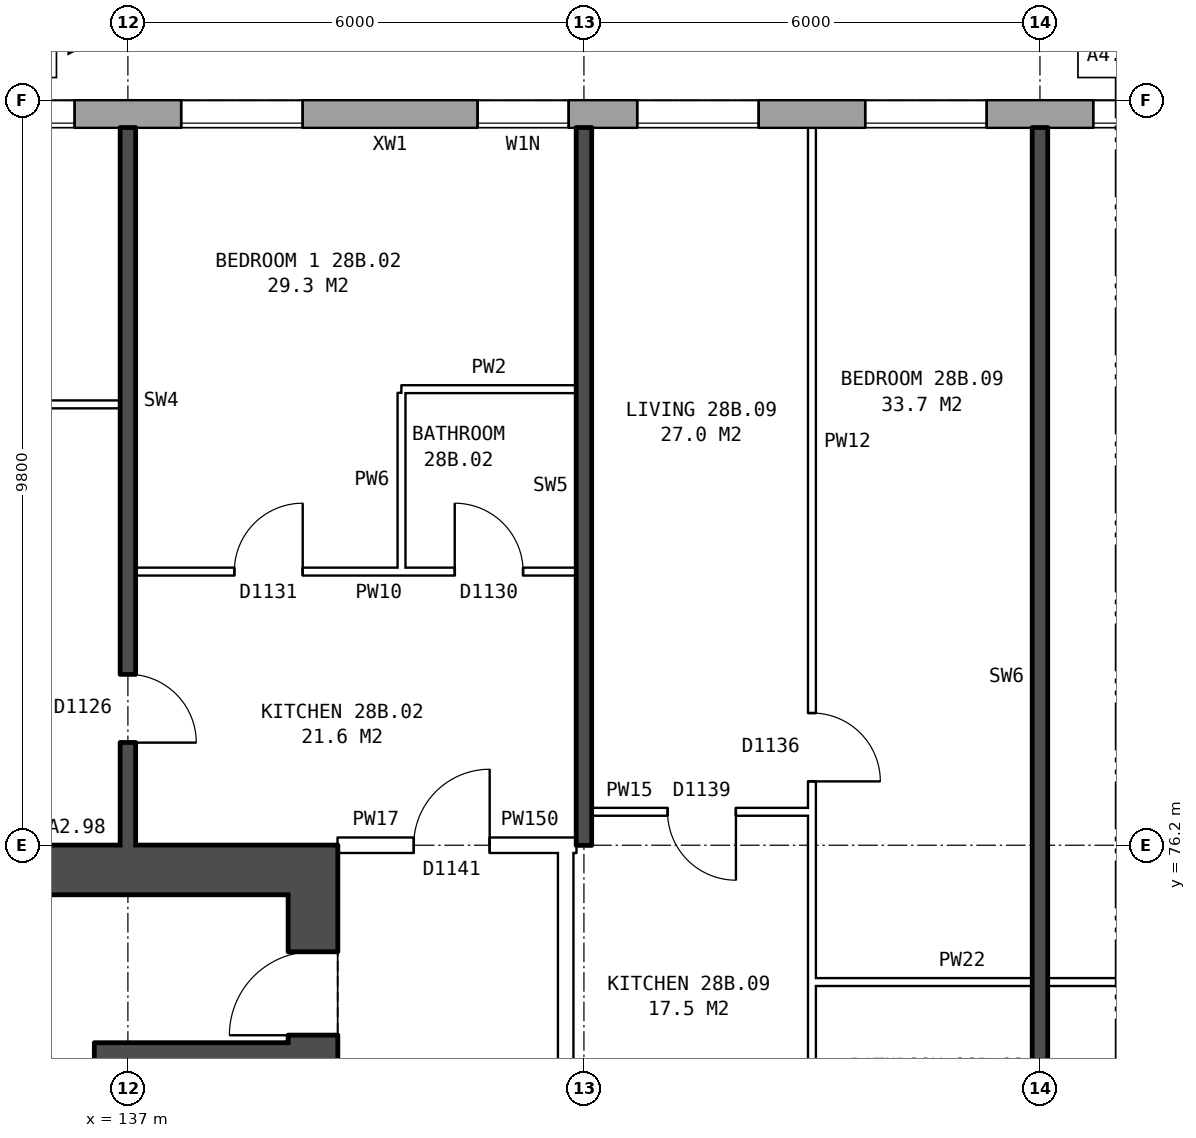
"""IFC4 building model, lengths in metres.
Left out: names, types, materials, properties, quantities, classifications, styles, units other than length and angle.
Written with IfcOpenShell. Run it as: python <this file> out.ifc"""

import sys

from ifc_helpers import new_model, si_unit, direction, frame, frame_2d, origin, place, context, subcontext, project, spatial, rectangle, extrude, element, fill, save


model = new_model("IFC4")
c1 = context("Model", 3, precision=1e-05, world=origin(), true_north=direction((0.0, 1.0)))
c2 = subcontext(c1, "Body", "Model", "MODEL_VIEW")
j1 = project(units=[si_unit("LENGTHUNIT", "METRE"), si_unit("PLANEANGLEUNIT", "RADIAN")], contexts=[c1])
p1 = place(None, origin())
s1 = spatial("IfcSite", under=j1, at=p1, CompositionType="ELEMENT")
p2 = place(p1, origin())
s2 = spatial("IfcBuilding", under=s1, at=p2, CompositionType="ELEMENT")
p3 = place(p2, frame((0.0, 0.0, 102.6)))
s3 = spatial("IfcBuildingStorey", under=s2, at=p3, CompositionType="ELEMENT", Elevation=102.6)
p4 = place(p3, frame((170.925, 85.82, 0.0), z_axis=(0.0, 0.0, 1.0), x_axis=(-1.0, 0.0, 0.0)))
e1 = element("IfcWall", 1, at=p4, inside=s3, PredefinedType="STANDARD", context=c2, shape_type="SweptSolid", body=[
    extrude(rectangle(XDim=36.851, YDim=0.36, at=frame_2d((18.425, 0.0))), origin(), (0.0, 0.0, 1.0), 2.85),
])
p5 = place(p4, frame((1.625, 0.0, 0.8)))
e2 = element("IfcOpeningElement", 2, at=p5, cuts=e1, PredefinedType="OPENING", context=c2, shape_type="SweptSolid", body=[
    extrude(rectangle(XDim=1.6, YDim=1.8, at=frame_2d((0.8, 0.9))), frame((0.0, 0.19, 0.0), z_axis=(0.0, -1.0, 0.0), x_axis=(1.0, 0.0, 0.0)), (0.0, 0.0, 1.0), 0.38),
])
p6 = place(p4, frame((4.125, 0.0, 0.8)))
e3 = element("IfcOpeningElement", 3, at=p6, cuts=e1, PredefinedType="OPENING", context=c2, shape_type="SweptSolid", body=[
    extrude(rectangle(XDim=0.8, YDim=1.8, at=frame_2d((0.4, 0.9))), frame((0.0, 0.19, 0.0), z_axis=(0.0, -1.0, 0.0), x_axis=(1.0, 0.0, 0.0)), (0.0, 0.0, 1.0), 0.38),
])
p7 = place(p4, frame((5.225, 0.0, 1.7)))
e4 = element("IfcOpeningElement", 4, at=p7, cuts=e1, PredefinedType="OPENING", context=c2, shape_type="SweptSolid", body=[
    extrude(rectangle(XDim=0.8, YDim=0.9, at=frame_2d((0.4, 0.45))), frame((0.0, 0.19, 0.0), z_axis=(0.0, -1.0, 0.0), x_axis=(1.0, 0.0, 0.0)), (0.0, 0.0, 1.0), 0.38),
])
p8 = place(p4, frame((10.625, 0.0, 0.8)))
e5 = element("IfcOpeningElement", 5, at=p8, cuts=e1, PredefinedType="OPENING", context=c2, shape_type="SweptSolid", body=[
    extrude(rectangle(XDim=1.6, YDim=1.8, at=frame_2d((0.8, 0.9))), frame((0.0, 0.19, 0.0), z_axis=(0.0, -1.0, 0.0), x_axis=(1.0, 0.0, 0.0)), (0.0, 0.0, 1.0), 0.38),
])
p9 = place(p4, frame((13.625, 0.0, 0.8)))
e6 = element("IfcOpeningElement", 6, at=p9, cuts=e1, PredefinedType="OPENING", context=c2, shape_type="SweptSolid", body=[
    extrude(rectangle(XDim=1.6, YDim=1.8, at=frame_2d((0.8, 0.9))), frame((0.0, 0.19, 0.0), z_axis=(0.0, -1.0, 0.0), x_axis=(1.0, 0.0, 0.0)), (0.0, 0.0, 1.0), 0.38),
])
p10 = place(p4, frame((16.625, 0.0, 0.8)))
e7 = element("IfcOpeningElement", 7, at=p10, cuts=e1, PredefinedType="OPENING", context=c2, shape_type="SweptSolid", body=[
    extrude(rectangle(XDim=1.6, YDim=1.8, at=frame_2d((0.8, 0.9))), frame((0.0, 0.19, 0.0), z_axis=(0.0, -1.0, 0.0), x_axis=(1.0, 0.0, 0.0)), (0.0, 0.0, 1.0), 0.38),
])
p11 = place(p4, frame((19.625, 0.0, 0.8)))
e8 = element("IfcOpeningElement", 8, at=p11, cuts=e1, PredefinedType="OPENING", context=c2, shape_type="SweptSolid", body=[
    extrude(rectangle(XDim=1.6, YDim=1.8, at=frame_2d((0.8, 0.9))), frame((0.0, 0.19, 0.0), z_axis=(0.0, -1.0, 0.0), x_axis=(1.0, 0.0, 0.0)), (0.0, 0.0, 1.0), 0.38),
])
p12 = place(p4, frame((22.625, 0.0, 0.8)))
e9 = element("IfcOpeningElement", 9, at=p12, cuts=e1, PredefinedType="OPENING", context=c2, shape_type="SweptSolid", body=[
    extrude(rectangle(XDim=1.6, YDim=1.8, at=frame_2d((0.8, 0.9))), frame((0.0, 0.19, 0.0), z_axis=(0.0, -1.0, 0.0), x_axis=(1.0, 0.0, 0.0)), (0.0, 0.0, 1.0), 0.38),
])
p13 = place(p4, frame((25.625, 0.0, 0.8)))
e10 = element("IfcOpeningElement", 10, at=p13, cuts=e1, PredefinedType="OPENING", context=c2, shape_type="SweptSolid", body=[
    extrude(rectangle(XDim=1.6, YDim=1.8, at=frame_2d((0.8, 0.9))), frame((0.0, 0.19, 0.0), z_axis=(0.0, -1.0, 0.0), x_axis=(1.0, 0.0, 0.0)), (0.0, 0.0, 1.0), 0.38),
])
p14 = place(p4, frame((28.125, 0.0, 0.8)))
e11 = element("IfcOpeningElement", 11, at=p14, cuts=e1, PredefinedType="OPENING", context=c2, shape_type="SweptSolid", body=[
    extrude(rectangle(XDim=1.2, YDim=1.2, at=frame_2d((0.6, 0.6))), frame((0.0, 0.19, 0.0), z_axis=(0.0, -1.0, 0.0), x_axis=(1.0, 0.0, 0.0)), (0.0, 0.0, 1.0), 0.38),
])
p15 = place(p4, frame((31.625, 0.0, 0.8)))
e12 = element("IfcOpeningElement", 12, at=p15, cuts=e1, PredefinedType="OPENING", context=c2, shape_type="SweptSolid", body=[
    extrude(rectangle(XDim=1.6, YDim=1.8, at=frame_2d((0.8, 0.9))), frame((0.0, 0.19, 0.0), z_axis=(0.0, -1.0, 0.0), x_axis=(1.0, 0.0, 0.0)), (0.0, 0.0, 1.0), 0.38),
])
p16 = place(p4, frame((34.625, 0.0, 0.8)))
e13 = element("IfcOpeningElement", 13, at=p16, cuts=e1, PredefinedType="OPENING", context=c2, shape_type="SweptSolid", body=[
    extrude(rectangle(XDim=1.6, YDim=1.8, at=frame_2d((0.8, 0.9))), frame((0.0, 0.19, 0.0), z_axis=(0.0, -1.0, 0.0), x_axis=(1.0, 0.0, 0.0)), (0.0, 0.0, 1.0), 0.38),
])
p17 = place(p4, frame((7.125, 0.0, 0.8)))
e14 = element("IfcOpeningElement", 14, at=p17, cuts=e1, PredefinedType="OPENING", context=c2, shape_type="SweptSolid", body=[
    extrude(rectangle(XDim=0.8, YDim=0.9, at=frame_2d((0.4, 0.45))), frame((0.0, 0.19, 0.0), z_axis=(0.0, -1.0, 0.0), x_axis=(1.0, 0.0, 0.0)), (0.0, 0.0, 1.0), 0.38),
])
p18 = place(p4, frame((8.225, 0.0, 0.8)))
e15 = element("IfcOpeningElement", 15, at=p18, cuts=e1, PredefinedType="OPENING", context=c2, shape_type="SweptSolid", body=[
    extrude(rectangle(XDim=1.4, YDim=1.8, at=frame_2d((0.7, 0.9))), frame((0.0, 0.19, 0.0), z_axis=(0.0, -1.0, 0.0), x_axis=(1.0, 0.0, 0.0)), (0.0, 0.0, 1.0), 0.38),
])
p19 = place(p3, frame((139.435, 64.45, 0.0), z_axis=(0.0, 0.0, 1.0), x_axis=(0.0, 1.0, 0.0)))
e16 = element("IfcWall", 16, at=p19, inside=s3, PredefinedType="SHEAR", context=c2, shape_type="SweptSolid", body=[
    extrude(rectangle(XDim=11.1, YDim=0.65, at=frame_2d((5.55, 0.0))), origin(), (0.0, 0.0, 1.0), 2.85),
])
p20 = place(p19, frame((0.675, 0.0, 0.0)))
e17 = element("IfcOpeningElement", 17, at=p20, cuts=e16, PredefinedType="OPENING", context=c2, shape_type="SweptSolid", body=[
    extrude(rectangle(XDim=1.1, YDim=2.1, at=frame_2d((0.55, 1.05))), frame((0.0, 0.335, 0.0), z_axis=(0.0, -1.0, 0.0), x_axis=(1.0, 0.0, 0.0)), (0.0, 0.0, 1.0), 0.67),
])
p21 = place(p19, frame((9.25, 0.0, 0.0)))
e18 = element("IfcOpeningElement", 18, at=p21, cuts=e16, PredefinedType="OPENING", context=c2, shape_type="SweptSolid", body=[
    extrude(rectangle(XDim=1.1, YDim=2.1, at=frame_2d((0.55, 1.05))), frame((0.0, 0.335, 0.0), z_axis=(0.0, -1.0, 0.0), x_axis=(1.0, 0.0, 0.0)), (0.0, 0.0, 1.0), 0.67),
])
p22 = place(p19, frame((7.475, 0.0, 0.0)))
e19 = element("IfcOpeningElement", 19, at=p22, cuts=e16, PredefinedType="OPENING", context=c2, shape_type="SweptSolid", body=[
    extrude(rectangle(XDim=0.85, YDim=2.1, at=frame_2d((0.425, 1.05))), frame((0.0, 0.335, 0.0), z_axis=(0.0, -1.0, 0.0), x_axis=(1.0, 0.0, 0.0)), (0.0, 0.0, 1.0), 0.67),
])
p23 = place(p3, frame((139.76, 75.875, 0.0), z_axis=(0.0, 0.0, 1.0), x_axis=(-1.0, 0.0, 0.0)))
e20 = element("IfcWall", 20, at=p23, inside=s3, PredefinedType="SHEAR", context=c2, shape_type="SweptSolid", body=[
    extrude(rectangle(XDim=8.4, YDim=0.65, at=frame_2d((4.2, 0.0))), origin(), (0.0, 0.0, 1.0), 2.85),
])
p24 = place(p3, frame((139.11, 73.45, 0.0), z_axis=(0.0, 0.0, 1.0), x_axis=(-1.0, 0.0, 0.0)))
e21 = element("IfcWall", 21, at=p24, inside=s3, PredefinedType="SHEAR", context=c2, shape_type="SweptSolid", body=[
    extrude(rectangle(XDim=2.25, YDim=0.3, at=frame_2d((1.125, 0.0))), origin(), (0.0, 0.0, 1.0), 2.85),
])
p25 = place(p3, frame((136.71, 71.4, 0.0), z_axis=(0.0, 0.0, 1.0), x_axis=(0.0, 1.0, 0.0)))
e22 = element("IfcWall", 22, at=p25, inside=s3, PredefinedType="SHEAR", context=c2, shape_type="SweptSolid", body=[
    extrude(rectangle(XDim=2.2, YDim=0.3, at=frame_2d((1.1, 0.0))), origin(), (0.0, 0.0, 1.0), 2.85),
])
p26 = place(p3, frame((142.76, 63.9, 0.0), z_axis=(0.0, 0.0, 1.0), x_axis=(0.0, 1.0, 0.0)))
e23 = element("IfcWall", 23, at=p26, inside=s3, PredefinedType="PARTITIONING", context=c2, shape_type="SweptSolid", body=[
    extrude(rectangle(XDim=12.2, YDim=0.2, at=frame_2d((6.1, 0.0))), origin(), (0.0, 0.0, 1.0), 2.85),
])
p27 = place(p26, frame((5.1, 0.0, 0.0)))
e24 = element("IfcOpeningElement", 24, at=p27, cuts=e23, PredefinedType="OPENING", context=c2, shape_type="SweptSolid", body=[
    extrude(rectangle(XDim=2.0, YDim=2.1, at=frame_2d((1.0, 1.05))), frame((0.0, 0.11, 0.0), z_axis=(0.0, -1.0, 0.0), x_axis=(1.0, 0.0, 0.0)), (0.0, 0.0, 1.0), 0.22),
])
p28 = place(p3, frame((146.0, 74.4, 0.0), z_axis=(0.0, 0.0, 1.0), x_axis=(1.0, 0.0, 0.0)))
e25 = element("IfcWall", 25, at=p28, inside=s3, PredefinedType="PARTITIONING", context=c2, shape_type="SweptSolid", body=[
    extrude(rectangle(XDim=6.0, YDim=0.1, at=frame_2d((3.0, 0.0))), origin(), (0.0, 0.0, 1.0), 2.85),
])
p29 = place(p3, frame((139.76, 76.2, 0.0), z_axis=(0.0, 0.0, 1.0), x_axis=(1.0, 0.0, 0.0)))
e26 = element("IfcWall", 26, at=p29, inside=s3, PredefinedType="PARTITIONING", context=c2, shape_type="SweptSolid", body=[
    extrude(rectangle(XDim=3.0, YDim=0.2, at=frame_2d((1.5, 0.0))), origin(), (0.0, 0.0, 1.0), 2.85),
])
p30 = place(p29, frame((1.0, 0.0, 0.0)))
e27 = element("IfcOpeningElement", 27, at=p30, cuts=e26, PredefinedType="OPENING", context=c2, shape_type="SweptSolid", body=[
    extrude(rectangle(XDim=1.0, YDim=2.1, at=frame_2d((0.5, 1.05))), frame((0.0, 0.11, 0.0), z_axis=(0.0, -1.0, 0.0), x_axis=(1.0, 0.0, 0.0)), (0.0, 0.0, 1.0), 0.22),
])
p31 = place(p3, frame((142.76, 76.2, 0.0), z_axis=(0.0, 0.0, 1.0), x_axis=(1.0, 0.0, 0.0)))
e28 = element("IfcWall", 28, at=p31, inside=s3, PredefinedType="PARTITIONING", context=c2, shape_type="SweptSolid", body=[
    extrude(rectangle(XDim=0.14, YDim=0.2, at=frame_2d((0.07, 0.0))), origin(), (0.0, 0.0, 1.0), 2.85),
])
p32 = place(p3, frame((143.1, 76.64, 0.0), z_axis=(0.0, 0.0, 1.0), x_axis=(1.0, 0.0, 0.0)))
e29 = element("IfcWall", 29, at=p32, inside=s3, PredefinedType="PARTITIONING", context=c2, shape_type="SweptSolid", body=[
    extrude(rectangle(XDim=2.9, YDim=0.1, at=frame_2d((1.45, 0.0))), origin(), (0.0, 0.0, 1.0), 2.85),
])
p33 = place(p32, frame((1.0, 0.0, 0.0)))
e30 = element("IfcOpeningElement", 30, at=p33, cuts=e29, PredefinedType="OPENING", context=c2, shape_type="SweptSolid", body=[
    extrude(rectangle(XDim=0.9, YDim=2.1, at=frame_2d((0.45, 1.05))), frame((0.0, 0.06, 0.0), z_axis=(0.0, -1.0, 0.0), x_axis=(1.0, 0.0, 0.0)), (0.0, 0.0, 1.0), 0.12),
])
p34 = place(p3, frame((137.1, 79.8, 0.0), z_axis=(0.0, 0.0, 1.0), x_axis=(1.0, 0.0, 0.0)))
e31 = element("IfcWall", 31, at=p34, inside=s3, PredefinedType="PARTITIONING", context=c2, shape_type="SweptSolid", body=[
    extrude(rectangle(XDim=5.8, YDim=0.1, at=frame_2d((2.9, 0.0))), origin(), (0.0, 0.0, 1.0), 2.85),
])
p35 = place(p34, frame((1.3, 0.0, 0.0)))
e32 = element("IfcOpeningElement", 32, at=p35, cuts=e31, PredefinedType="OPENING", context=c2, shape_type="SweptSolid", body=[
    extrude(rectangle(XDim=0.9, YDim=2.1, at=frame_2d((0.45, 1.05))), frame((0.0, 0.06, 0.0), z_axis=(0.0, -1.0, 0.0), x_axis=(1.0, 0.0, 0.0)), (0.0, 0.0, 1.0), 0.12),
])
p36 = place(p34, frame((4.2, 0.0, 0.0)))
e33 = element("IfcOpeningElement", 33, at=p36, cuts=e31, PredefinedType="OPENING", context=c2, shape_type="SweptSolid", body=[
    extrude(rectangle(XDim=0.9, YDim=2.1, at=frame_2d((0.45, 1.05))), frame((0.0, 0.06, 0.0), z_axis=(0.0, -1.0, 0.0), x_axis=(1.0, 0.0, 0.0)), (0.0, 0.0, 1.0), 0.12),
])
p37 = place(p3, frame((131.36, 82.0, 0.0), z_axis=(0.0, 0.0, 1.0), x_axis=(1.0, 0.0, 0.0)))
e34 = element("IfcWall", 34, at=p37, inside=s3, PredefinedType="PARTITIONING", context=c2, shape_type="SweptSolid", body=[
    extrude(rectangle(XDim=5.54, YDim=0.1, at=frame_2d((2.77, 0.0))), origin(), (0.0, 0.0, 1.0), 2.85),
])
p38 = place(p37, frame((2.32, 0.0, 0.0)))
e35 = element("IfcOpeningElement", 35, at=p38, cuts=e34, PredefinedType="OPENING", context=c2, shape_type="SweptSolid", body=[
    extrude(rectangle(XDim=0.9, YDim=2.1, at=frame_2d((0.45, 1.05))), frame((0.0, 0.06, 0.0), z_axis=(0.0, -1.0, 0.0), x_axis=(1.0, 0.0, 0.0)), (0.0, 0.0, 1.0), 0.12),
])
p39 = place(p3, frame((140.6, 82.2, 0.0), z_axis=(0.0, 0.0, 1.0), x_axis=(1.0, 0.0, 0.0)))
e36 = element("IfcWall", 36, at=p39, inside=s3, PredefinedType="PARTITIONING", context=c2, shape_type="SweptSolid", body=[
    extrude(rectangle(XDim=2.3, YDim=0.1, at=frame_2d((1.15, 0.0))), origin(), (0.0, 0.0, 1.0), 2.85),
])
p40 = place(p3, frame((137.0, 76.2, 0.0), z_axis=(0.0, 0.0, 1.0), x_axis=(0.0, 1.0, 0.0)))
e37 = element("IfcWall", 37, at=p40, inside=s3, PredefinedType="SOLIDWALL", context=c2, shape_type="SweptSolid", body=[
    extrude(rectangle(XDim=9.44, YDim=0.2, at=frame_2d((4.72, 0.0))), origin(), (0.0, 0.0, 1.0), 2.85),
])
p41 = place(p40, frame((1.35, 0.0, 0.0)))
e38 = element("IfcOpeningElement", 38, at=p41, cuts=e37, PredefinedType="OPENING", context=c2, shape_type="SweptSolid", body=[
    extrude(rectangle(XDim=0.9, YDim=2.1, at=frame_2d((0.45, 1.05))), frame((0.0, 0.11, 0.0), z_axis=(0.0, -1.0, 0.0), x_axis=(1.0, 0.0, 0.0)), (0.0, 0.0, 1.0), 0.22),
])
p42 = place(p3, frame((140.6, 79.85, 0.0), z_axis=(0.0, 0.0, 1.0), x_axis=(0.0, 1.0, 0.0)))
e39 = element("IfcWall", 39, at=p42, inside=s3, PredefinedType="PARTITIONING", context=c2, shape_type="SweptSolid", body=[
    extrude(rectangle(XDim=2.3, YDim=0.1, at=frame_2d((1.15, 0.0))), origin(), (0.0, 0.0, 1.0), 2.85),
])
p43 = place(p3, frame((143.0, 76.2, 0.0), z_axis=(0.0, 0.0, 1.0), x_axis=(0.0, 1.0, 0.0)))
e40 = element("IfcWall", 40, at=p43, inside=s3, PredefinedType="SOLIDWALL", context=c2, shape_type="SweptSolid", body=[
    extrude(rectangle(XDim=9.44, YDim=0.2, at=frame_2d((4.72, 0.0))), origin(), (0.0, 0.0, 1.0), 2.85),
])
p44 = place(p3, frame((146.0, 71.3, 0.0), z_axis=(0.0, 0.0, 1.0), x_axis=(0.0, 1.0, 0.0)))
e41 = element("IfcWall", 41, at=p44, inside=s3, PredefinedType="PARTITIONING", context=c2, shape_type="SweptSolid", body=[
    extrude(rectangle(XDim=14.34, YDim=0.1, at=frame_2d((7.17, 0.0))), origin(), (0.0, 0.0, 1.0), 2.85),
])
p45 = place(p44, frame((5.74, 0.0, 0.0)))
e42 = element("IfcOpeningElement", 42, at=p45, cuts=e41, PredefinedType="OPENING", context=c2, shape_type="SweptSolid", body=[
    extrude(rectangle(XDim=0.9, YDim=2.1, at=frame_2d((0.45, 1.05))), frame((0.0, 0.06, 0.0), z_axis=(0.0, -1.0, 0.0), x_axis=(1.0, 0.0, 0.0)), (0.0, 0.0, 1.0), 0.12),
])
p46 = place(p44, frame((0.4, 0.0, 0.0)))
e43 = element("IfcOpeningElement", 43, at=p46, cuts=e41, PredefinedType="OPENING", context=c2, shape_type="SweptSolid", body=[
    extrude(rectangle(XDim=0.9, YDim=2.1, at=frame_2d((0.45, 1.05))), frame((0.0, 0.06, 0.0), z_axis=(0.0, -1.0, 0.0), x_axis=(1.0, 0.0, 0.0)), (0.0, 0.0, 1.0), 0.12),
])
p47 = place(p3, frame((149.0, 71.2, 0.0), z_axis=(0.0, 0.0, 1.0), x_axis=(0.0, 1.0, 0.0)))
e44 = element("IfcWall", 44, at=p47, inside=s3, PredefinedType="SOLIDWALL", context=c2, shape_type="SweptSolid", body=[
    extrude(rectangle(XDim=14.44, YDim=0.2, at=frame_2d((7.22, 0.0))), origin(), (0.0, 0.0, 1.0), 2.85),
])
p48 = place(p11, origin())
e45 = element("IfcWindow", 45, at=p48, inside=s3, PartitioningType="SINGLE_PANEL", PredefinedType="WINDOW", context=c2, shape_type="SweptSolid", body=[
    extrude(rectangle(XDim=1.6, YDim=1.8, at=frame_2d((0.8, 0.9))), frame((0.0, 0.15, 0.0), z_axis=(0.0, -1.0, 0.0), x_axis=(1.0, 0.0, 0.0)), (0.0, 0.0, 1.0), 0.06),
])
fill(e8, e45)
p49 = place(p12, origin())
e46 = element("IfcWindow", 46, at=p49, inside=s3, PartitioningType="SINGLE_PANEL", PredefinedType="WINDOW", context=c2, shape_type="SweptSolid", body=[
    extrude(rectangle(XDim=1.6, YDim=1.8, at=frame_2d((0.8, 0.9))), frame((0.0, 0.15, 0.0), z_axis=(0.0, -1.0, 0.0), x_axis=(1.0, 0.0, 0.0)), (0.0, 0.0, 1.0), 0.06),
])
fill(e9, e46)
p50 = place(p13, origin())
e47 = element("IfcWindow", 47, at=p50, inside=s3, PartitioningType="SINGLE_PANEL", PredefinedType="WINDOW", context=c2, shape_type="SweptSolid", body=[
    extrude(rectangle(XDim=1.6, YDim=1.8, at=frame_2d((0.8, 0.9))), frame((0.0, 0.15, 0.0), z_axis=(0.0, -1.0, 0.0), x_axis=(1.0, 0.0, 0.0)), (0.0, 0.0, 1.0), 0.06),
])
fill(e10, e47)
p51 = place(p14, origin())
e48 = element("IfcWindow", 48, at=p51, inside=s3, PartitioningType="SINGLE_PANEL", PredefinedType="WINDOW", context=c2, shape_type="SweptSolid", body=[
    extrude(rectangle(XDim=1.2, YDim=1.2, at=frame_2d((0.6, 0.6))), frame((0.0, 0.15, 0.0), z_axis=(0.0, -1.0, 0.0), x_axis=(1.0, 0.0, 0.0)), (0.0, 0.0, 1.0), 0.06),
])
fill(e11, e48)
p52 = place(p15, origin())
e49 = element("IfcWindow", 49, at=p52, inside=s3, PartitioningType="SINGLE_PANEL", PredefinedType="WINDOW", context=c2, shape_type="SweptSolid", body=[
    extrude(rectangle(XDim=1.6, YDim=1.8, at=frame_2d((0.8, 0.9))), frame((0.0, 0.15, 0.0), z_axis=(0.0, -1.0, 0.0), x_axis=(1.0, 0.0, 0.0)), (0.0, 0.0, 1.0), 0.06),
])
fill(e12, e49)
p53 = place(p16, origin())
e50 = element("IfcWindow", 50, at=p53, inside=s3, PartitioningType="SINGLE_PANEL", PredefinedType="WINDOW", context=c2, shape_type="SweptSolid", body=[
    extrude(rectangle(XDim=1.6, YDim=1.8, at=frame_2d((0.8, 0.9))), frame((0.0, 0.15, 0.0), z_axis=(0.0, -1.0, 0.0), x_axis=(1.0, 0.0, 0.0)), (0.0, 0.0, 1.0), 0.06),
])
fill(e13, e50)
p54 = place(p21, origin())
e51 = element("IfcDoor", 51, at=p54, inside=s3, OperationType="SINGLE_SWING_LEFT", PredefinedType="DOOR", context=c2, shape_type="SweptSolid", body=[
    extrude(rectangle(XDim=1.1, YDim=2.1, at=frame_2d((0.55, 1.05))), frame((0.0, 0.31, 0.0), z_axis=(0.0, -1.0, 0.0), x_axis=(1.0, 0.0, 0.0)), (0.0, 0.0, 1.0), 0.05),
])
fill(e18, e51)
p55 = place(p35, origin())
e52 = element("IfcDoor", 52, at=p55, inside=s3, OperationType="SINGLE_SWING_RIGHT", PredefinedType="DOOR", context=c2, shape_type="SweptSolid", body=[
    extrude(rectangle(XDim=0.9, YDim=2.1, at=frame_2d((0.45, 1.05))), frame((0.0, 0.025, 0.0), z_axis=(0.0, -1.0, 0.0), x_axis=(1.0, 0.0, 0.0)), (0.0, 0.0, 1.0), 0.05),
])
fill(e32, e52)
p56 = place(p30, origin())
e53 = element("IfcDoor", 53, at=p56, inside=s3, OperationType="SINGLE_SWING_RIGHT", PredefinedType="DOOR", context=c2, shape_type="SweptSolid", body=[
    extrude(rectangle(XDim=1.0, YDim=2.1, at=frame_2d((0.5, 1.05))), frame((0.0, 0.025, 0.0), z_axis=(0.0, -1.0, 0.0), x_axis=(1.0, 0.0, 0.0)), (0.0, 0.0, 1.0), 0.05),
])
fill(e27, e53)
p57 = place(p41, frame((0.9, 0.0, 0.0), z_axis=(0.0, 0.0, 1.0), x_axis=(-1.0, 0.0, 0.0)))
e54 = element("IfcDoor", 54, at=p57, inside=s3, OperationType="SINGLE_SWING_RIGHT", PredefinedType="DOOR", context=c2, shape_type="SweptSolid", body=[
    extrude(rectangle(XDim=0.9, YDim=2.1, at=frame_2d((0.45, 1.05))), frame((0.0, 0.025, 0.0), z_axis=(0.0, -1.0, 0.0), x_axis=(1.0, 0.0, 0.0)), (0.0, 0.0, 1.0), 0.05),
])
fill(e38, e54)
p58 = place(p36, origin())
e55 = element("IfcDoor", 55, at=p58, inside=s3, OperationType="SINGLE_SWING_LEFT", PredefinedType="DOOR", context=c2, shape_type="SweptSolid", body=[
    extrude(rectangle(XDim=0.9, YDim=2.1, at=frame_2d((0.45, 1.05))), frame((0.0, 0.025, 0.0), z_axis=(0.0, -1.0, 0.0), x_axis=(1.0, 0.0, 0.0)), (0.0, 0.0, 1.0), 0.05),
])
fill(e33, e55)
p59 = place(p45, frame((0.9, 0.0, 0.0), z_axis=(0.0, 0.0, 1.0), x_axis=(-1.0, 0.0, 0.0)))
e56 = element("IfcDoor", 56, at=p59, inside=s3, OperationType="SINGLE_SWING_RIGHT", PredefinedType="DOOR", context=c2, shape_type="SweptSolid", body=[
    extrude(rectangle(XDim=0.9, YDim=2.1, at=frame_2d((0.45, 1.05))), frame((0.0, 0.025, 0.0), z_axis=(0.0, -1.0, 0.0), x_axis=(1.0, 0.0, 0.0)), (0.0, 0.0, 1.0), 0.05),
])
fill(e42, e56)
p60 = place(p33, frame((0.9, 0.0, 0.0), z_axis=(0.0, 0.0, 1.0), x_axis=(-1.0, 0.0, 0.0)))
e57 = element("IfcDoor", 57, at=p60, inside=s3, OperationType="SINGLE_SWING_LEFT", PredefinedType="DOOR", context=c2, shape_type="SweptSolid", body=[
    extrude(rectangle(XDim=0.9, YDim=2.1, at=frame_2d((0.45, 1.05))), frame((0.0, 0.025, 0.0), z_axis=(0.0, -1.0, 0.0), x_axis=(1.0, 0.0, 0.0)), (0.0, 0.0, 1.0), 0.05),
])
fill(e30, e57)
save(model, sys.argv[1])
